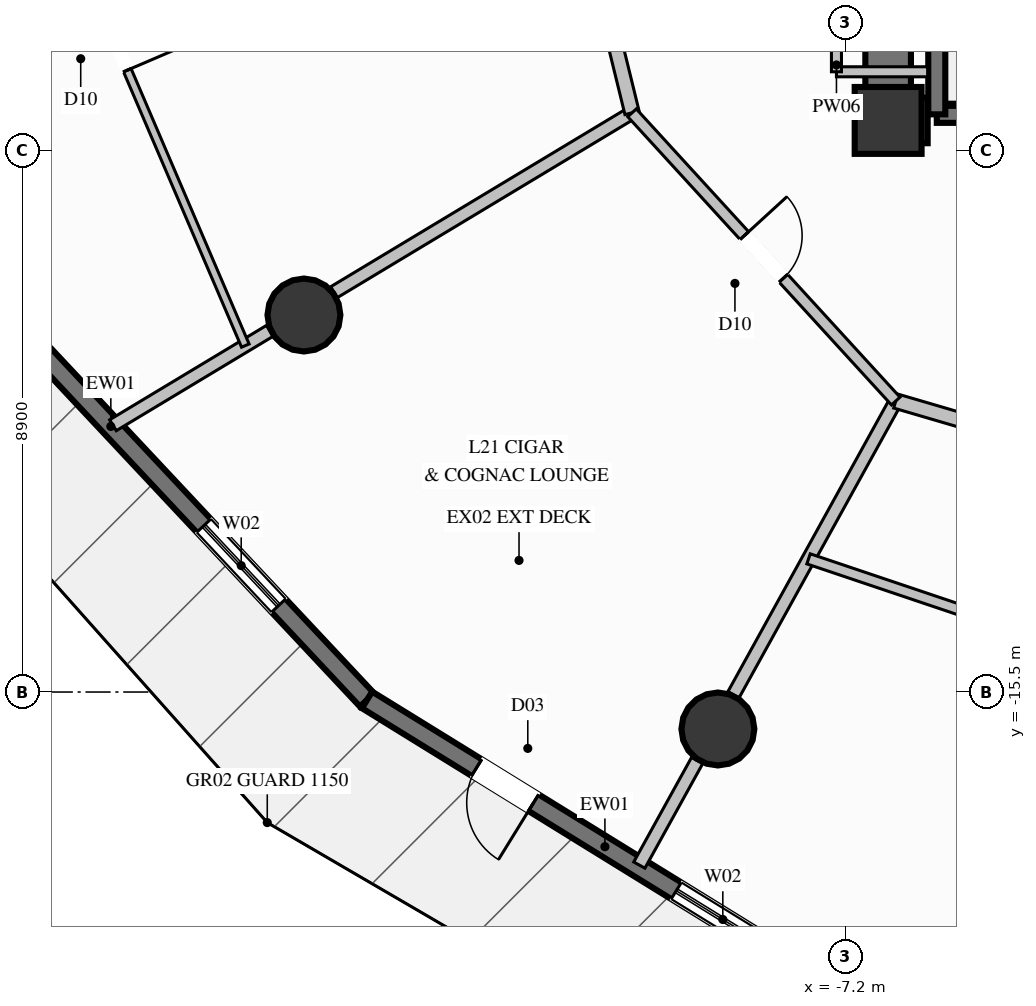
"""IFC4 building model, lengths in metres.
Left out: names, types, materials, properties, quantities, classifications, styles, units other than length and angle.
Written with IfcOpenShell. Run it as: python <this file> out.ifc"""

import sys

from ifc_helpers import new_model, si_unit, direction, frame, frame_2d, origin, origin_2d, place, context, subcontext, project, spatial, rectangle, circle, extrude, element, fill, save


model = new_model("IFC4")
c1 = context("Model", 3, precision=1e-05, world=origin(), true_north=direction((0.0, 1.0)))
c2 = subcontext(c1, "Body", "Model", "MODEL_VIEW")
j1 = project(units=[si_unit("LENGTHUNIT", "METRE"), si_unit("PLANEANGLEUNIT", "RADIAN")], contexts=[c1])
p1 = place(None, origin())
s1 = spatial("IfcSite", under=j1, at=p1, CompositionType="ELEMENT")
p2 = place(p1, origin())
s2 = spatial("IfcBuilding", under=s1, at=p2, CompositionType="ELEMENT")
p3 = place(p2, frame((0.0, 0.0, 86.0)))
s3 = spatial("IfcBuildingStorey", under=s2, at=p3, CompositionType="ELEMENT", Elevation=86.0)
p4 = place(p3, frame((-6.5, -6.1, 0.0), z_axis=(0.0, 0.0, 1.0), x_axis=(1.0, 0.0, 0.0)))
e1 = element("IfcColumn", 1, at=p4, inside=s3, PredefinedType="COLUMN", context=c2, shape_type="SweptSolid", body=[
    extrude(rectangle(XDim=1.1, YDim=1.1, at=origin_2d()), origin(), (0.0, 0.0, 1.0), 3.6),
])
p5 = place(p3, frame((-6.125, -6.1, 0.0), z_axis=(0.0, 0.0, 1.0), x_axis=(1.0, 0.0, 0.0)))
e2 = element("IfcWall", 2, at=p5, inside=s3, PredefinedType="SHEAR", context=c2, shape_type="SweptSolid", body=[
    extrude(rectangle(XDim=0.275, YDim=0.75, at=frame_2d((0.137, 0.0))), origin(), (0.0, 0.0, 1.0), 3.6),
])
p6 = place(p3, frame((-6.5, -6.475, 0.0), z_axis=(0.0, 0.0, 1.0), x_axis=(0.0, 1.0, 0.0)))
e3 = element("IfcWall", 3, at=p6, inside=s3, PredefinedType="SHEAR", context=c2, shape_type="SweptSolid", body=[
    extrude(rectangle(XDim=3.125, YDim=0.75, at=frame_2d((1.562, 0.0))), origin(), (0.0, 0.0, 1.0), 3.6),
])
for number, where, z_axis, x_axis in (
    (4, (-16.108, -9.3, 0.0), (0.0, 0.0, 1.0), (1.0, 0.0, 0.0)),
    (5, (-9.3, -16.108, 0.0), (0.0, 0.0, 1.0), (1.0, 0.0, 0.0)),
):
    element("IfcColumn", number, at=place(p3, frame(where, z_axis=z_axis, x_axis=x_axis)), inside=s3, PredefinedType="COLUMN", context=c2, shape_type="SweptSolid", body=[
        extrude(circle(Radius=0.6, at=origin_2d()), origin(), (0.0, 0.0, 1.0), 3.6),
    ])
p7 = place(p3, frame((-15.07, -15.63, 0.0), z_axis=(0.0, 0.0, 1.0), x_axis=(-0.683739802552, 0.729725895393, 0.0)))
e6 = element("IfcWall", 6, at=p7, inside=s3, PredefinedType="SOLIDWALL", context=c2, shape_type="SweptSolid", body=[
    extrude(rectangle(XDim=8.149, YDim=0.32, at=frame_2d((4.075, 0.0))), origin(), (0.0, 0.0, 1.0), 3.34),
])
p8 = place(p7, frame((2.127, 0.0, 0.35)))
e7 = element("IfcOpeningElement", 7, at=p8, cuts=e6, PredefinedType="OPENING", context=c2, shape_type="SweptSolid", body=[
    extrude(rectangle(XDim=1.8, YDim=2.6, at=frame_2d((0.9, 1.3))), frame((0.0, 0.17, 0.0), z_axis=(0.0, -1.0, 0.0), x_axis=(1.0, 0.0, 0.0)), (0.0, 0.0, 1.0), 0.34),
])
p9 = place(p3, frame((-7.91, -20.048, 0.0), z_axis=(0.0, 0.0, 1.0), x_axis=(-0.851023045081, 0.525128343113, 0.0)))
e8 = element("IfcWall", 8, at=p9, inside=s3, PredefinedType="SOLIDWALL", context=c2, shape_type="SweptSolid", body=[
    extrude(rectangle(XDim=8.414, YDim=0.32, at=frame_2d((4.207, 0.0))), origin(), (0.0, 0.0, 1.0), 3.34),
])
p10 = place(p9, frame((0.638, 0.0, 0.35)))
e9 = element("IfcOpeningElement", 9, at=p10, cuts=e8, PredefinedType="OPENING", context=c2, shape_type="SweptSolid", body=[
    extrude(rectangle(XDim=1.8, YDim=2.6, at=frame_2d((0.9, 1.3))), frame((0.0, 0.17, 0.0), z_axis=(0.0, -1.0, 0.0), x_axis=(1.0, 0.0, 0.0)), (0.0, 0.0, 1.0), 0.34),
])
p11 = place(p9, frame((5.195, 0.0, 0.0)))
e10 = element("IfcOpeningElement", 10, at=p11, cuts=e8, PredefinedType="OPENING", context=c2, shape_type="SweptSolid", body=[
    extrude(rectangle(XDim=1.1, YDim=2.2, at=frame_2d((0.55, 1.1))), frame((0.0, 0.17, 0.0), z_axis=(0.0, -1.0, 0.0), x_axis=(1.0, 0.0, 0.0)), (0.0, 0.0, 1.0), 0.34),
])
p12 = place(p3, frame((-5.7, -6.0, 0.0), z_axis=(0.0, 0.0, 1.0), x_axis=(1.0, 0.0, 0.0)))
e11 = element("IfcWall", 11, at=p12, inside=s3, PredefinedType="SOLIDWALL", context=c2, shape_type="SweptSolid", body=[
    extrude(rectangle(XDim=2.1, YDim=0.28, at=frame_2d((1.05, 0.0))), origin(), (0.0, 0.0, 1.0), 3.34),
])
p13 = place(p12, frame((0.5, 0.0, 0.0)))
e12 = element("IfcOpeningElement", 12, at=p13, cuts=e11, PredefinedType="OPENING", context=c2, shape_type="SweptSolid", body=[
    extrude(rectangle(XDim=1.1, YDim=2.2, at=frame_2d((0.55, 1.1))), frame((0.0, 0.15, 0.0), z_axis=(0.0, -1.0, 0.0), x_axis=(1.0, 0.0, 0.0)), (0.0, 0.0, 1.0), 0.3),
])
p14 = place(p3, frame((-5.7, -3.5, 0.0), z_axis=(0.0, 0.0, 1.0), x_axis=(0.0, -1.0, 0.0)))
e13 = element("IfcWall", 13, at=p14, inside=s3, PredefinedType="SOLIDWALL", context=c2, shape_type="SweptSolid", body=[
    extrude(rectangle(XDim=2.5, YDim=0.28, at=frame_2d((1.25, 0.0))), origin(), (0.0, 0.0, 1.0), 3.34),
])
p15 = place(p3, frame((-7.35, -5.3, 0.0), z_axis=(0.0, 0.0, 1.0), x_axis=(1.0, 0.0, 0.0)))
e14 = element("IfcWall", 14, at=p15, inside=s3, PredefinedType="PARTITIONING", context=c2, shape_type="SweptSolid", body=[
    extrude(rectangle(XDim=1.5, YDim=0.165, at=frame_2d((0.75, 0.0))), origin(), (0.0, 0.0, 1.0), 2.425),
])
p16 = place(p3, frame((-7.35, -3.4, 0.0), z_axis=(0.0, 0.0, 1.0), x_axis=(0.0, -1.0, 0.0)))
e15 = element("IfcWall", 15, at=p16, inside=s3, PredefinedType="PARTITIONING", context=c2, shape_type="SweptSolid", body=[
    extrude(rectangle(XDim=1.9, YDim=0.165, at=frame_2d((0.95, 0.0))), origin(), (0.0, 0.0, 1.0), 3.34),
])
p17 = place(p16, frame((0.475, 0.0, 0.0)))
e16 = element("IfcOpeningElement", 16, at=p17, cuts=e15, PredefinedType="OPENING", context=c2, shape_type="SweptSolid", body=[
    extrude(rectangle(XDim=0.95, YDim=2.1, at=frame_2d((0.475, 1.05))), frame((0.0, 0.093, 0.0), z_axis=(0.0, -1.0, 0.0), x_axis=(1.0, 0.0, 0.0)), (0.0, 0.0, 1.0), 0.185),
])
p18 = place(p3, frame((-10.712, -5.975, 0.0), z_axis=(0.0, 0.0, 1.0), x_axis=(-0.856821988231, -0.515612335465, 0.0)))
e17 = element("IfcWall", 17, at=p18, inside=s3, PredefinedType="PARTITIONING", context=c2, shape_type="SweptSolid", body=[
    extrude(rectangle(XDim=5.721, YDim=0.21, at=frame_2d((2.861, 0.0))), origin(), (0.0, 0.0, 1.0), 2.709),
])
p19 = place(p3, frame((-16.67, -9.561, 0.0), z_axis=(0.0, 0.0, 1.0), x_axis=(-0.856826644169, -0.515604598352, 0.0)))
e18 = element("IfcWall", 18, at=p19, inside=s3, PredefinedType="PARTITIONING", context=c2, shape_type="SweptSolid", body=[
    extrude(rectangle(XDim=3.01, YDim=0.21, at=frame_2d((1.505, 0.0))), origin(), (0.0, 0.0, 1.0), 3.34),
])
p20 = place(p3, frame((-6.375, -10.715, 0.0), z_axis=(0.0, 0.0, 1.0), x_axis=(-0.483601358844, -0.875288367182, 0.0)))
e19 = element("IfcWall", 19, at=p20, inside=s3, PredefinedType="PARTITIONING", context=c2, shape_type="SweptSolid", body=[
    extrude(rectangle(XDim=5.517, YDim=0.21, at=frame_2d((2.758, 0.0))), origin(), (0.0, 0.0, 1.0), 2.709),
])
p21 = place(p3, frame((-9.641, -16.626, 0.0), z_axis=(0.0, 0.0, 1.0), x_axis=(-0.48384887839, -0.875151565662, 0.0)))
e20 = element("IfcWall", 20, at=p21, inside=s3, PredefinedType="PARTITIONING", context=c2, shape_type="SweptSolid", body=[
    extrude(rectangle(XDim=1.965, YDim=0.21, at=frame_2d((0.983, 0.0))), origin(), (0.0, 0.0, 1.0), 3.34),
])
p22 = place(p3, frame((-6.375, -10.715, 0.0), z_axis=(0.0, 0.0, 1.0), x_axis=(0.959654395115, -0.281182221942, 0.0)))
e21 = element("IfcWall", 21, at=p22, inside=s3, PredefinedType="PARTITIONING", context=c2, shape_type="SweptSolid", body=[
    extrude(rectangle(XDim=2.593, YDim=0.24, at=frame_2d((1.296, 0.0))), origin(), (0.0, 0.0, 1.0), 3.34),
])
p23 = place(p3, frame((-7.809, -13.31, 0.0), z_axis=(0.0, 0.0, 1.0), x_axis=(0.947659066077, -0.319284034179, 0.0)))
e22 = element("IfcWall", 22, at=p23, inside=s3, PredefinedType="PLUMBINGWALL", context=c2, shape_type="SweptSolid", body=[
    extrude(rectangle(XDim=3.329, YDim=0.175, at=frame_2d((1.665, 0.0))), origin(), (0.0, 0.0, 1.0), 3.34),
])
p24 = place(p3, frame((-12.3, 0.5, 0.0), z_axis=(0.0, 0.0, 1.0), x_axis=(0.238207841689, -0.971214200966, 0.0)))
e23 = element("IfcWall", 23, at=p24, inside=s3, PredefinedType="PARTITIONING", context=c2, shape_type="SweptSolid", body=[
    extrude(rectangle(XDim=6.667, YDim=0.24, at=frame_2d((3.333, 0.0))), origin(), (0.0, 0.0, 1.0), 3.34),
])
p25 = place(p3, frame((-21.328, 0.128, 0.0), z_axis=(0.0, 0.0, 1.0), x_axis=(0.393900208444, -0.91915321127, 0.0)))
e24 = element("IfcWall", 24, at=p25, inside=s3, PredefinedType="PARTITIONING", context=c2, shape_type="SweptSolid", body=[
    extrude(rectangle(XDim=10.804, YDim=0.135, at=frame_2d((5.402, 0.0))), origin(), (0.0, 0.0, 1.0), 3.34),
])
p26 = place(p25, frame((4.927, 0.0, 0.0)))
e25 = element("IfcOpeningElement", 25, at=p26, cuts=e24, PredefinedType="OPENING", context=c2, shape_type="SweptSolid", body=[
    extrude(rectangle(XDim=0.95, YDim=2.1, at=frame_2d((0.475, 1.05))), frame((0.0, 0.078, 0.0), z_axis=(0.0, -1.0, 0.0), x_axis=(1.0, 0.0, 0.0)), (0.0, 0.0, 1.0), 0.155),
])
p27 = place(p3, frame((-10.712, -5.975, 0.0), z_axis=(0.0, 0.0, 1.0), x_axis=(0.675041189424, -0.737780043496, 0.0)))
e26 = element("IfcWall", 26, at=p27, inside=s3, PredefinedType="PARTITIONING", context=c2, shape_type="SweptSolid", body=[
    extrude(rectangle(XDim=6.425, YDim=0.19, at=frame_2d((3.212, 0.0))), origin(), (0.0, 0.0, 1.0), 3.34),
])
p28 = place(p27, frame((2.737, 0.0, 0.0)))
e27 = element("IfcOpeningElement", 27, at=p28, cuts=e26, PredefinedType="OPENING", context=c2, shape_type="SweptSolid", body=[
    extrude(rectangle(XDim=0.95, YDim=2.1, at=frame_2d((0.475, 1.05))), frame((0.0, 0.105, 0.0), z_axis=(0.0, -1.0, 0.0), x_axis=(1.0, 0.0, 0.0)), (0.0, 0.0, 1.0), 0.21),
])
p29 = place(p8, origin())
e28 = element("IfcWindow", 28, at=p29, inside=s3, PartitioningType="SINGLE_PANEL", PredefinedType="WINDOW", context=c2, shape_type="SweptSolid", body=[
    extrude(rectangle(XDim=1.8, YDim=2.6, at=frame_2d((0.9, 1.3))), frame((0.0, 0.03, 0.0), z_axis=(0.0, -1.0, 0.0), x_axis=(1.0, 0.0, 0.0)), (0.0, 0.0, 1.0), 0.06),
])
fill(e7, e28)
p30 = place(p10, origin())
e29 = element("IfcWindow", 29, at=p30, inside=s3, PartitioningType="SINGLE_PANEL", PredefinedType="WINDOW", context=c2, shape_type="SweptSolid", body=[
    extrude(rectangle(XDim=1.8, YDim=2.6, at=frame_2d((0.9, 1.3))), frame((0.0, 0.03, 0.0), z_axis=(0.0, -1.0, 0.0), x_axis=(1.0, 0.0, 0.0)), (0.0, 0.0, 1.0), 0.06),
])
fill(e9, e29)
p31 = place(p11, origin())
e30 = element("IfcDoor", 30, at=p31, inside=s3, OperationType="SINGLE_SWING_LEFT", PredefinedType="DOOR", context=c2, shape_type="SweptSolid", body=[
    extrude(rectangle(XDim=1.1, YDim=2.2, at=frame_2d((0.55, 1.1))), frame((0.0, 0.025, 0.0), z_axis=(0.0, -1.0, 0.0), x_axis=(1.0, 0.0, 0.0)), (0.0, 0.0, 1.0), 0.05),
])
fill(e10, e30)
p32 = place(p26, origin())
e31 = element("IfcDoor", 31, at=p32, inside=s3, OperationType="SINGLE_SWING_RIGHT", PredefinedType="DOOR", context=c2, shape_type="SweptSolid", body=[
    extrude(rectangle(XDim=0.95, YDim=2.1, at=frame_2d((0.475, 1.05))), frame((0.0, 0.025, 0.0), z_axis=(0.0, -1.0, 0.0), x_axis=(1.0, 0.0, 0.0)), (0.0, 0.0, 1.0), 0.05),
])
fill(e25, e31)
p33 = place(p28, origin())
e32 = element("IfcDoor", 32, at=p33, inside=s3, OperationType="SINGLE_SWING_LEFT", PredefinedType="DOOR", context=c2, shape_type="SweptSolid", body=[
    extrude(rectangle(XDim=0.95, YDim=2.1, at=frame_2d((0.475, 1.05))), frame((0.0, 0.025, 0.0), z_axis=(0.0, -1.0, 0.0), x_axis=(1.0, 0.0, 0.0)), (0.0, 0.0, 1.0), 0.05),
])
fill(e27, e32)
save(model, sys.argv[1])
